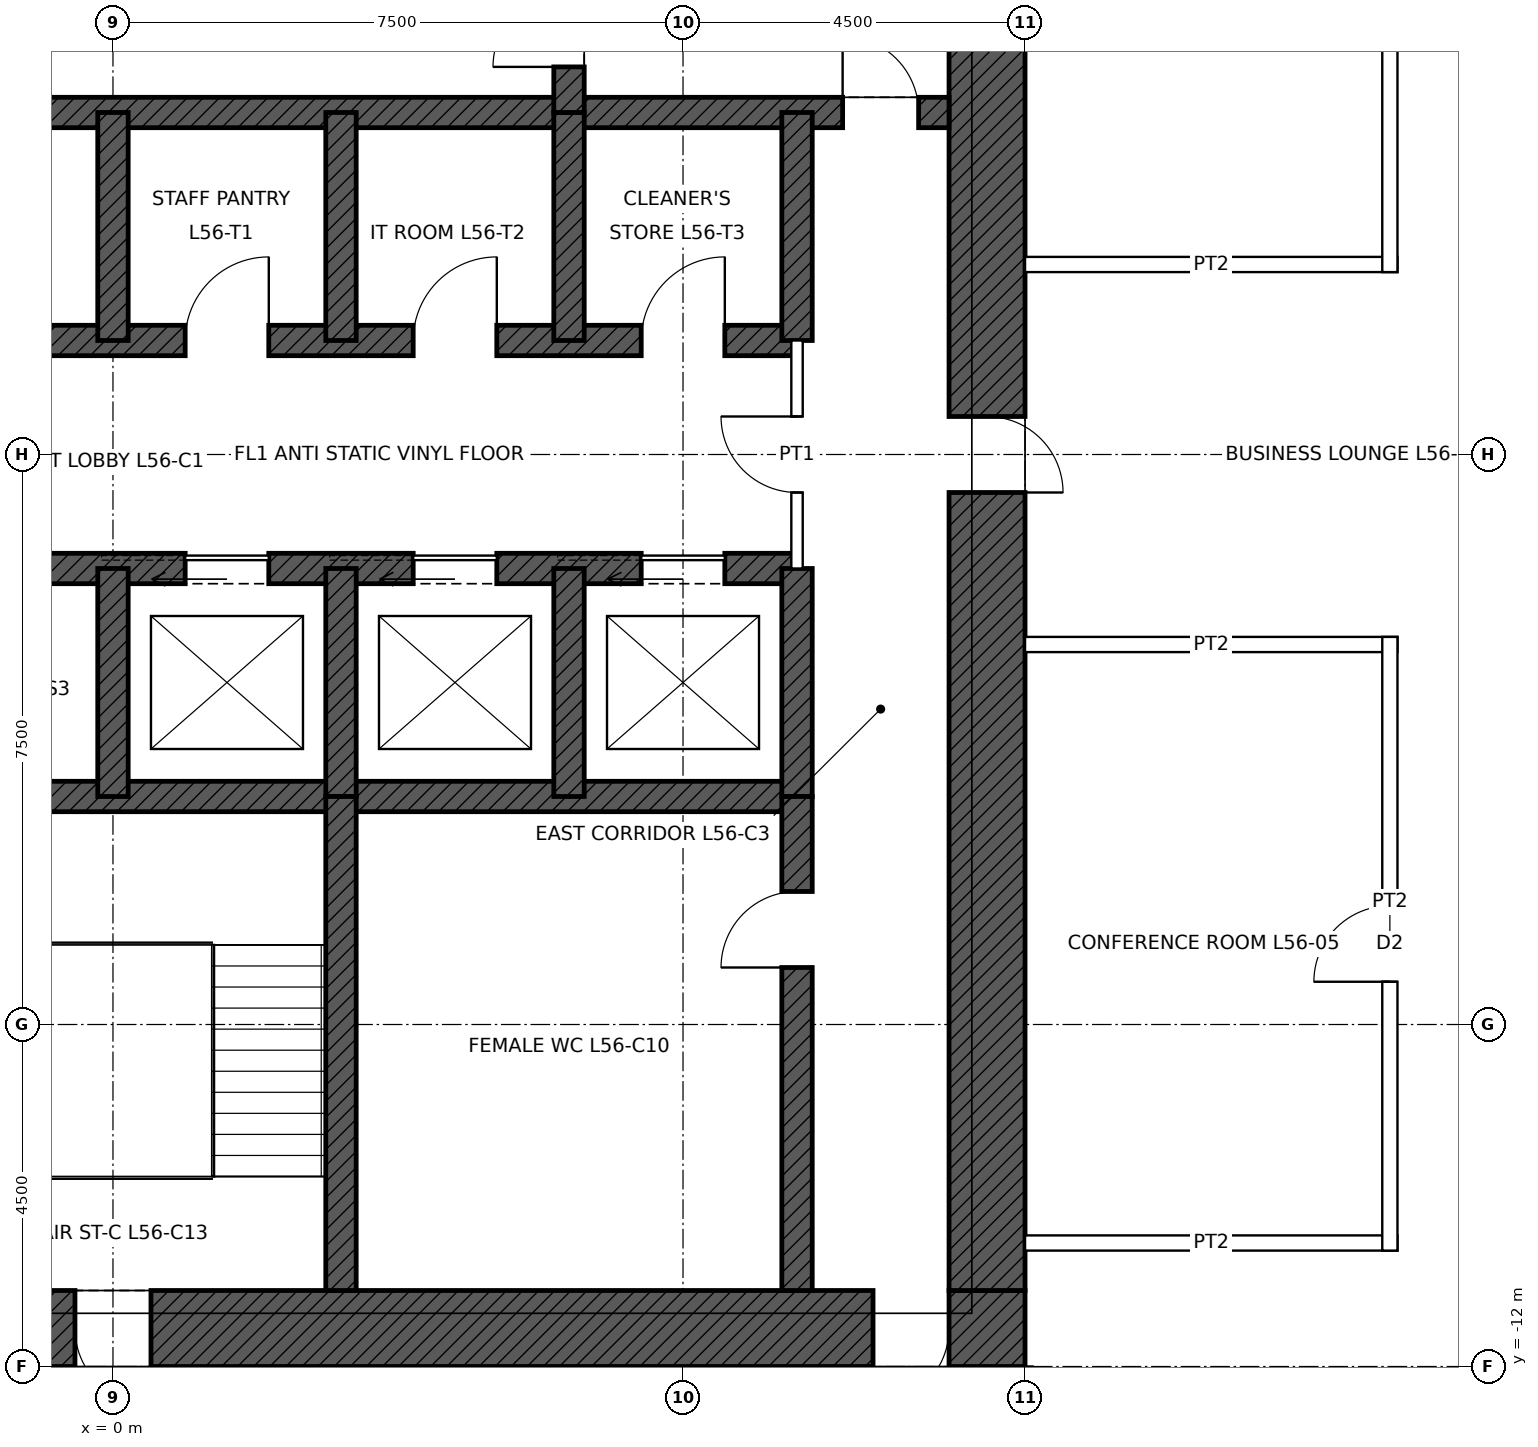
"""IFC4 building model, lengths in metres.
Left out: names, types, materials, properties, quantities, classifications, styles, units other than length and angle.
Written with IfcOpenShell. Run it as: python <this file> out.ifc"""

import sys

from ifc_helpers import new_model, si_unit, direction, frame, frame_2d, origin, place, context, subcontext, project, spatial, rectangle, extrude, element, fill, save


model = new_model("IFC4")
c1 = context("Model", 3, precision=1e-05, world=origin(), true_north=direction((0.0, 1.0)))
c2 = subcontext(c1, "Body", "Model", "MODEL_VIEW")
j1 = project(units=[si_unit("LENGTHUNIT", "METRE"), si_unit("PLANEANGLEUNIT", "RADIAN")], contexts=[c1])
p1 = place(None, origin())
s1 = spatial("IfcSite", under=j1, at=p1, CompositionType="ELEMENT")
p2 = place(p1, origin())
s2 = spatial("IfcBuilding", under=s1, at=p2, CompositionType="ELEMENT")
p3 = place(p2, frame((0.0, 0.0, 259.9)))
s3 = spatial("IfcBuildingStorey", under=s2, at=p3, CompositionType="ELEMENT", Elevation=259.9)
p4 = place(p3, frame((12.0, -11.5, 0.0), z_axis=(0.0, 0.0, 1.0), x_axis=(-1.0, 0.0, 0.0)))
e1 = element("IfcWall", 1, at=p4, inside=s3, PredefinedType="SHEAR", context=c2, shape_type="SweptSolid", body=[
    extrude(rectangle(XDim=24.0, YDim=1.0, at=frame_2d((12.0, 0.0))), origin(), (0.0, 0.0, 1.0), 4.0),
])
p5 = place(p4, frame((11.5, 0.0, 0.0)))
e2 = element("IfcOpeningElement", 2, at=p5, cuts=e1, PredefinedType="OPENING", context=c2, shape_type="SweptSolid", body=[
    extrude(rectangle(XDim=1.0, YDim=2.1, at=frame_2d((0.5, 1.05))), frame((0.0, 0.51, 0.0), z_axis=(0.0, -1.0, 0.0), x_axis=(1.0, 0.0, 0.0)), (0.0, 0.0, 1.0), 1.02),
])
p6 = place(p4, frame((1.0, 0.0, 0.0)))
e3 = element("IfcOpeningElement", 3, at=p6, cuts=e1, PredefinedType="OPENING", context=c2, shape_type="SweptSolid", body=[
    extrude(rectangle(XDim=1.0, YDim=2.4, at=frame_2d((0.5, 1.2))), frame((0.0, 0.51, 0.0), z_axis=(0.0, -1.0, 0.0), x_axis=(1.0, 0.0, 0.0)), (0.0, 0.0, 1.0), 1.02),
])
p7 = place(p3, frame((11.5, 11.0, 0.0), z_axis=(0.0, 0.0, 1.0), x_axis=(0.0, -1.0, 0.0)))
e4 = element("IfcWall", 4, at=p7, inside=s3, PredefinedType="SHEAR", context=c2, shape_type="SweptSolid", body=[
    extrude(rectangle(XDim=22.0, YDim=1.0, at=frame_2d((11.0, 0.0))), origin(), (0.0, 0.0, 1.0), 4.0),
])
p8 = place(p7, frame((10.5, 0.0, 0.0)))
e5 = element("IfcOpeningElement", 5, at=p8, cuts=e4, PredefinedType="OPENING", context=c2, shape_type="SweptSolid", body=[
    extrude(rectangle(XDim=1.0, YDim=2.4, at=frame_2d((0.5, 1.2))), frame((0.0, 0.51, 0.0), z_axis=(0.0, -1.0, 0.0), x_axis=(1.0, 0.0, 0.0)), (0.0, 0.0, 1.0), 1.02),
])
p9 = place(p3, frame((-11.0, 4.5, 0.0), z_axis=(0.0, 0.0, 1.0), x_axis=(1.0, 0.0, 0.0)))
e6 = element("IfcWall", 6, at=p9, inside=s3, PredefinedType="SHEAR", context=c2, shape_type="SweptSolid", body=[
    extrude(rectangle(XDim=22.0, YDim=0.4, at=frame_2d((11.0, 0.0))), origin(), (0.0, 0.0, 1.0), 4.0),
])
p10 = place(p9, frame((0.4, 0.0, 0.0)))
e7 = element("IfcOpeningElement", 7, at=p10, cuts=e6, PredefinedType="OPENING", context=c2, shape_type="SweptSolid", body=[
    extrude(rectangle(XDim=1.0, YDim=2.1, at=frame_2d((0.5, 1.05))), frame((0.0, 0.21, 0.0), z_axis=(0.0, -1.0, 0.0), x_axis=(1.0, 0.0, 0.0)), (0.0, 0.0, 1.0), 0.42),
])
p11 = place(p9, frame((20.6, 0.0, 0.0)))
e8 = element("IfcOpeningElement", 8, at=p11, cuts=e6, PredefinedType="OPENING", context=c2, shape_type="SweptSolid", body=[
    extrude(rectangle(XDim=1.0, YDim=2.1, at=frame_2d((0.5, 1.05))), frame((0.0, 0.21, 0.0), z_axis=(0.0, -1.0, 0.0), x_axis=(1.0, 0.0, 0.0)), (0.0, 0.0, 1.0), 0.42),
])
p12 = place(p3, frame((-9.0, 1.5, 0.0), z_axis=(0.0, 0.0, 1.0), x_axis=(1.0, 0.0, 0.0)))
e9 = element("IfcWall", 9, at=p12, inside=s3, PredefinedType="SHEAR", context=c2, shape_type="SweptSolid", body=[
    extrude(rectangle(XDim=18.0, YDim=0.4, at=frame_2d((9.0, 0.0))), origin(), (0.0, 0.0, 1.0), 4.0),
])
p13 = place(p12, frame((0.95, 0.0, 0.0)))
e10 = element("IfcOpeningElement", 10, at=p13, cuts=e9, PredefinedType="OPENING", context=c2, shape_type="SweptSolid", body=[
    extrude(rectangle(XDim=1.1, YDim=2.1, at=frame_2d((0.55, 1.05))), frame((0.0, 0.21, 0.0), z_axis=(0.0, -1.0, 0.0), x_axis=(1.0, 0.0, 0.0)), (0.0, 0.0, 1.0), 0.42),
])
p14 = place(p12, frame((3.95, 0.0, 0.0)))
e11 = element("IfcOpeningElement", 11, at=p14, cuts=e9, PredefinedType="OPENING", context=c2, shape_type="SweptSolid", body=[
    extrude(rectangle(XDim=1.1, YDim=2.1, at=frame_2d((0.55, 1.05))), frame((0.0, 0.21, 0.0), z_axis=(0.0, -1.0, 0.0), x_axis=(1.0, 0.0, 0.0)), (0.0, 0.0, 1.0), 0.42),
])
p15 = place(p12, frame((6.95, 0.0, 0.0)))
e12 = element("IfcOpeningElement", 12, at=p15, cuts=e9, PredefinedType="OPENING", context=c2, shape_type="SweptSolid", body=[
    extrude(rectangle(XDim=1.1, YDim=2.1, at=frame_2d((0.55, 1.05))), frame((0.0, 0.21, 0.0), z_axis=(0.0, -1.0, 0.0), x_axis=(1.0, 0.0, 0.0)), (0.0, 0.0, 1.0), 0.42),
])
p16 = place(p12, frame((9.95, 0.0, 0.0)))
e13 = element("IfcOpeningElement", 13, at=p16, cuts=e9, PredefinedType="OPENING", context=c2, shape_type="SweptSolid", body=[
    extrude(rectangle(XDim=1.1, YDim=2.1, at=frame_2d((0.55, 1.05))), frame((0.0, 0.21, 0.0), z_axis=(0.0, -1.0, 0.0), x_axis=(1.0, 0.0, 0.0)), (0.0, 0.0, 1.0), 0.42),
])
p17 = place(p12, frame((12.95, 0.0, 0.0)))
e14 = element("IfcOpeningElement", 14, at=p17, cuts=e9, PredefinedType="OPENING", context=c2, shape_type="SweptSolid", body=[
    extrude(rectangle(XDim=1.1, YDim=2.1, at=frame_2d((0.55, 1.05))), frame((0.0, 0.21, 0.0), z_axis=(0.0, -1.0, 0.0), x_axis=(1.0, 0.0, 0.0)), (0.0, 0.0, 1.0), 0.42),
])
p18 = place(p12, frame((15.95, 0.0, 0.0)))
e15 = element("IfcOpeningElement", 15, at=p18, cuts=e9, PredefinedType="OPENING", context=c2, shape_type="SweptSolid", body=[
    extrude(rectangle(XDim=1.1, YDim=2.1, at=frame_2d((0.55, 1.05))), frame((0.0, 0.21, 0.0), z_axis=(0.0, -1.0, 0.0), x_axis=(1.0, 0.0, 0.0)), (0.0, 0.0, 1.0), 0.42),
])
p19 = place(p3, frame((-9.0, -1.5, 0.0), z_axis=(0.0, 0.0, 1.0), x_axis=(1.0, 0.0, 0.0)))
e16 = element("IfcWall", 16, at=p19, inside=s3, PredefinedType="SHEAR", context=c2, shape_type="SweptSolid", body=[
    extrude(rectangle(XDim=18.0, YDim=0.4, at=frame_2d((9.0, 0.0))), origin(), (0.0, 0.0, 1.0), 4.0),
])
p20 = place(p19, frame((9.95, 0.0, 0.0)))
e17 = element("IfcOpeningElement", 17, at=p20, cuts=e16, PredefinedType="OPENING", context=c2, shape_type="SweptSolid", body=[
    extrude(rectangle(XDim=1.1, YDim=2.1, at=frame_2d((0.55, 1.05))), frame((0.0, 0.21, 0.0), z_axis=(0.0, -1.0, 0.0), x_axis=(1.0, 0.0, 0.0)), (0.0, 0.0, 1.0), 0.42),
])
p21 = place(p19, frame((12.95, 0.0, 0.0)))
e18 = element("IfcOpeningElement", 18, at=p21, cuts=e16, PredefinedType="OPENING", context=c2, shape_type="SweptSolid", body=[
    extrude(rectangle(XDim=1.1, YDim=2.1, at=frame_2d((0.55, 1.05))), frame((0.0, 0.21, 0.0), z_axis=(0.0, -1.0, 0.0), x_axis=(1.0, 0.0, 0.0)), (0.0, 0.0, 1.0), 0.42),
])
p22 = place(p19, frame((15.95, 0.0, 0.0)))
e19 = element("IfcOpeningElement", 19, at=p22, cuts=e16, PredefinedType="OPENING", context=c2, shape_type="SweptSolid", body=[
    extrude(rectangle(XDim=1.1, YDim=2.1, at=frame_2d((0.55, 1.05))), frame((0.0, 0.21, 0.0), z_axis=(0.0, -1.0, 0.0), x_axis=(1.0, 0.0, 0.0)), (0.0, 0.0, 1.0), 0.42),
])
p23 = place(p19, frame((0.95, 0.0, 0.0)))
e20 = element("IfcOpeningElement", 20, at=p23, cuts=e16, PredefinedType="OPENING", context=c2, shape_type="SweptSolid", body=[
    extrude(rectangle(XDim=1.1, YDim=2.1, at=frame_2d((0.55, 1.05))), frame((0.0, 0.21, 0.0), z_axis=(0.0, -1.0, 0.0), x_axis=(1.0, 0.0, 0.0)), (0.0, 0.0, 1.0), 0.42),
])
p24 = place(p19, frame((3.95, 0.0, 0.0)))
e21 = element("IfcOpeningElement", 21, at=p24, cuts=e16, PredefinedType="OPENING", context=c2, shape_type="SweptSolid", body=[
    extrude(rectangle(XDim=1.1, YDim=2.1, at=frame_2d((0.55, 1.05))), frame((0.0, 0.21, 0.0), z_axis=(0.0, -1.0, 0.0), x_axis=(1.0, 0.0, 0.0)), (0.0, 0.0, 1.0), 0.42),
])
p25 = place(p19, frame((6.95, 0.0, 0.0)))
e22 = element("IfcOpeningElement", 22, at=p25, cuts=e16, PredefinedType="OPENING", context=c2, shape_type="SweptSolid", body=[
    extrude(rectangle(XDim=1.1, YDim=2.1, at=frame_2d((0.55, 1.05))), frame((0.0, 0.21, 0.0), z_axis=(0.0, -1.0, 0.0), x_axis=(1.0, 0.0, 0.0)), (0.0, 0.0, 1.0), 0.42),
])
p26 = place(p3, frame((-9.0, -4.5, 0.0), z_axis=(0.0, 0.0, 1.0), x_axis=(1.0, 0.0, 0.0)))
e23 = element("IfcWall", 23, at=p26, inside=s3, PredefinedType="SHEAR", context=c2, shape_type="SweptSolid", body=[
    extrude(rectangle(XDim=18.0, YDim=0.4, at=frame_2d((9.0, 0.0))), origin(), (0.0, 0.0, 1.0), 4.0),
])
for number, where, z_axis, x_axis in (
    (24, (9.0, 1.5, 0.0), (0.0, 0.0, 1.0), (0.0, 1.0, 0.0)),
    (25, (9.0, -4.5, 0.0), (0.0, 0.0, 1.0), (0.0, 1.0, 0.0)),
    (26, (0.0, 1.5, 0.0), (0.0, 0.0, 1.0), (0.0, 1.0, 0.0)),
    (27, (3.0, 1.5, 0.0), (0.0, 0.0, 1.0), (0.0, 1.0, 0.0)),
    (28, (6.0, 1.5, 0.0), (0.0, 0.0, 1.0), (0.0, 1.0, 0.0)),
    (29, (0.0, -4.5, 0.0), (0.0, 0.0, 1.0), (0.0, 1.0, 0.0)),
    (30, (3.0, -4.5, 0.0), (0.0, 0.0, 1.0), (0.0, 1.0, 0.0)),
    (31, (6.0, -4.5, 0.0), (0.0, 0.0, 1.0), (0.0, 1.0, 0.0)),
):
    element("IfcWall", number, at=place(p3, frame(where, z_axis=z_axis, x_axis=x_axis)), inside=s3, PredefinedType="SHEAR", context=c2, shape_type="SweptSolid", body=[
        extrude(rectangle(XDim=3.0, YDim=0.4, at=frame_2d((1.5, 0.0))), origin(), (0.0, 0.0, 1.0), 4.0),
    ])
p27 = place(p3, frame((6.0, 4.5, 0.0), z_axis=(0.0, 0.0, 1.0), x_axis=(0.0, 1.0, 0.0)))
e32 = element("IfcWall", 32, at=p27, inside=s3, PredefinedType="SHEAR", context=c2, shape_type="SweptSolid", body=[
    extrude(rectangle(XDim=6.5, YDim=0.4, at=frame_2d((3.25, 0.0))), origin(), (0.0, 0.0, 1.0), 4.0),
])
p28 = place(p27, frame((0.6, 0.0, 0.0)))
e33 = element("IfcOpeningElement", 33, at=p28, cuts=e32, PredefinedType="OPENING", context=c2, shape_type="SweptSolid", body=[
    extrude(rectangle(XDim=1.0, YDim=2.1, at=frame_2d((0.5, 1.05))), frame((0.0, 0.21, 0.0), z_axis=(0.0, -1.0, 0.0), x_axis=(1.0, 0.0, 0.0)), (0.0, 0.0, 1.0), 0.42),
])
p29 = place(p3, frame((9.0, -11.0, 0.0), z_axis=(0.0, 0.0, 1.0), x_axis=(0.0, 1.0, 0.0)))
e34 = element("IfcWall", 34, at=p29, inside=s3, PredefinedType="SHEAR", context=c2, shape_type="SweptSolid", body=[
    extrude(rectangle(XDim=6.5, YDim=0.4, at=frame_2d((3.25, 0.0))), origin(), (0.0, 0.0, 1.0), 4.0),
])
p30 = place(p29, frame((4.25, 0.0, 0.0)))
e35 = element("IfcOpeningElement", 35, at=p30, cuts=e34, PredefinedType="OPENING", context=c2, shape_type="SweptSolid", body=[
    extrude(rectangle(XDim=1.0, YDim=2.1, at=frame_2d((0.5, 1.05))), frame((0.0, 0.21, 0.0), z_axis=(0.0, -1.0, 0.0), x_axis=(1.0, 0.0, 0.0)), (0.0, 0.0, 1.0), 0.42),
])
p31 = place(p3, frame((3.0, -11.0, 0.0), z_axis=(0.0, 0.0, 1.0), x_axis=(0.0, 1.0, 0.0)))
e36 = element("IfcWall", 36, at=p31, inside=s3, PredefinedType="SHEAR", context=c2, shape_type="SweptSolid", body=[
    extrude(rectangle(XDim=6.5, YDim=0.4, at=frame_2d((3.25, 0.0))), origin(), (0.0, 0.0, 1.0), 4.0),
])
for number, where, z_axis, x_axis in (
    (37, (12.0, -10.375, 0.0), (0.0, 0.0, 1.0), (1.0, 0.0, 0.0)),
    (38, (12.0, -2.5, 0.0), (0.0, 0.0, 1.0), (1.0, 0.0, 0.0)),
    (39, (12.0, 2.5, 0.0), (0.0, 0.0, 1.0), (1.0, 0.0, 0.0)),
):
    element("IfcWall", number, at=place(p3, frame(where, z_axis=z_axis, x_axis=x_axis)), inside=s3, PredefinedType="PARTITIONING", context=c2, shape_type="SweptSolid", body=[
        extrude(rectangle(XDim=4.9, YDim=0.2, at=frame_2d((2.45, 0.0))), origin(), (0.0, 0.0, 1.0), 3.85),
    ])
p32 = place(p3, frame((16.8, -10.475, 0.0), z_axis=(0.0, 0.0, 1.0), x_axis=(0.0, 1.0, 0.0)))
e40 = element("IfcWall", 40, at=p32, inside=s3, PredefinedType="PARTITIONING", context=c2, shape_type="SweptSolid", body=[
    extrude(rectangle(XDim=8.075, YDim=0.2, at=frame_2d((4.038, 0.0))), origin(), (0.0, 0.0, 1.0), 3.85),
])
p33 = place(p32, frame((3.538, 0.0, 0.0)))
e41 = element("IfcOpeningElement", 41, at=p33, cuts=e40, PredefinedType="OPENING", context=c2, shape_type="SweptSolid", body=[
    extrude(rectangle(XDim=1.0, YDim=2.1, at=frame_2d((0.5, 1.05))), frame((0.0, 0.11, 0.0), z_axis=(0.0, -1.0, 0.0), x_axis=(1.0, 0.0, 0.0)), (0.0, 0.0, 1.0), 0.22),
])
p34 = place(p3, frame((16.8, 2.4, 0.0), z_axis=(0.0, 0.0, 1.0), x_axis=(0.0, 1.0, 0.0)))
e42 = element("IfcWall", 42, at=p34, inside=s3, PredefinedType="PARTITIONING", context=c2, shape_type="SweptSolid", body=[
    extrude(rectangle(XDim=8.075, YDim=0.2, at=frame_2d((4.038, 0.0))), origin(), (0.0, 0.0, 1.0), 3.85),
])
p35 = place(p34, frame((3.538, 0.0, 0.0)))
e43 = element("IfcOpeningElement", 43, at=p35, cuts=e42, PredefinedType="OPENING", context=c2, shape_type="SweptSolid", body=[
    extrude(rectangle(XDim=1.0, YDim=2.1, at=frame_2d((0.5, 1.05))), frame((0.0, 0.11, 0.0), z_axis=(0.0, -1.0, 0.0), x_axis=(1.0, 0.0, 0.0)), (0.0, 0.0, 1.0), 0.22),
])
p36 = place(p3, frame((9.0, -1.5, 0.0), z_axis=(0.0, 0.0, 1.0), x_axis=(0.0, 1.0, 0.0)))
e44 = element("IfcWall", 44, at=p36, inside=s3, PredefinedType="PARTITIONING", context=c2, shape_type="SweptSolid", body=[
    extrude(rectangle(XDim=3.0, YDim=0.15, at=frame_2d((1.5, 0.0))), origin(), (0.0, 0.0, 1.0), 3.75),
])
p37 = place(p36, frame((1.0, 0.0, 0.0)))
e45 = element("IfcOpeningElement", 45, at=p37, cuts=e44, PredefinedType="OPENING", context=c2, shape_type="SweptSolid", body=[
    extrude(rectangle(XDim=1.0, YDim=2.4, at=frame_2d((0.5, 1.2))), frame((0.0, 0.085, 0.0), z_axis=(0.0, -1.0, 0.0), x_axis=(1.0, 0.0, 0.0)), (0.0, 0.0, 1.0), 0.17),
])
p38 = place(p11, origin())
e46 = element("IfcDoor", 46, at=p38, inside=s3, OperationType="SINGLE_SWING_LEFT", PredefinedType="DOOR", context=c2, shape_type="SweptSolid", body=[
    extrude(rectangle(XDim=1.0, YDim=2.1, at=frame_2d((0.5, 1.05))), frame((0.0, 0.025, 0.0), z_axis=(0.0, -1.0, 0.0), x_axis=(1.0, 0.0, 0.0)), (0.0, 0.0, 1.0), 0.05),
])
fill(e8, e46)
p39 = place(p28, origin())
e47 = element("IfcDoor", 47, at=p39, inside=s3, OperationType="SINGLE_SWING_LEFT", PredefinedType="DOOR", context=c2, shape_type="SweptSolid", body=[
    extrude(rectangle(XDim=1.0, YDim=2.1, at=frame_2d((0.5, 1.05))), frame((0.0, 0.025, 0.0), z_axis=(0.0, -1.0, 0.0), x_axis=(1.0, 0.0, 0.0)), (0.0, 0.0, 1.0), 0.05),
])
fill(e33, e47)
p40 = place(p5, origin())
e48 = element("IfcDoor", 48, at=p40, inside=s3, OperationType="SINGLE_SWING_LEFT", PredefinedType="DOOR", context=c2, shape_type="SweptSolid", body=[
    extrude(rectangle(XDim=1.0, YDim=2.1, at=frame_2d((0.5, 1.05))), frame((0.0, 0.485, 0.0), z_axis=(0.0, -1.0, 0.0), x_axis=(1.0, 0.0, 0.0)), (0.0, 0.0, 1.0), 0.05),
])
fill(e2, e48)
p41 = place(p8, origin())
e49 = element("IfcDoor", 49, at=p41, inside=s3, OperationType="SINGLE_SWING_RIGHT", PredefinedType="DOOR", context=c2, shape_type="SweptSolid", body=[
    extrude(rectangle(XDim=1.0, YDim=2.4, at=frame_2d((0.5, 1.2))), frame((0.0, 0.485, 0.0), z_axis=(0.0, -1.0, 0.0), x_axis=(1.0, 0.0, 0.0)), (0.0, 0.0, 1.0), 0.05),
])
fill(e5, e49)
p42 = place(p6, origin())
e50 = element("IfcDoor", 50, at=p42, inside=s3, OperationType="SINGLE_SWING_RIGHT", PredefinedType="DOOR", context=c2, shape_type="SweptSolid", body=[
    extrude(rectangle(XDim=1.0, YDim=2.4, at=frame_2d((0.5, 1.2))), frame((0.0, 0.485, 0.0), z_axis=(0.0, -1.0, 0.0), x_axis=(1.0, 0.0, 0.0)), (0.0, 0.0, 1.0), 0.05),
])
fill(e3, e50)
p43 = place(p30, origin())
e51 = element("IfcDoor", 51, at=p43, inside=s3, OperationType="SINGLE_SWING_LEFT", PredefinedType="DOOR", context=c2, shape_type="SweptSolid", body=[
    extrude(rectangle(XDim=1.0, YDim=2.1, at=frame_2d((0.5, 1.05))), frame((0.0, 0.025, 0.0), z_axis=(0.0, -1.0, 0.0), x_axis=(1.0, 0.0, 0.0)), (0.0, 0.0, 1.0), 0.05),
])
fill(e35, e51)
p44 = place(p20, origin())
e52 = element("IfcDoor", 52, at=p44, inside=s3, OperationType="SLIDING_TO_LEFT", PredefinedType="DOOR", context=c2, shape_type="SweptSolid", body=[
    extrude(rectangle(XDim=1.1, YDim=2.1, at=frame_2d((0.55, 1.05))), frame((0.0, 0.025, 0.0), z_axis=(0.0, -1.0, 0.0), x_axis=(1.0, 0.0, 0.0)), (0.0, 0.0, 1.0), 0.05),
])
fill(e17, e52)
p45 = place(p21, origin())
e53 = element("IfcDoor", 53, at=p45, inside=s3, OperationType="SLIDING_TO_LEFT", PredefinedType="DOOR", context=c2, shape_type="SweptSolid", body=[
    extrude(rectangle(XDim=1.1, YDim=2.1, at=frame_2d((0.55, 1.05))), frame((0.0, 0.025, 0.0), z_axis=(0.0, -1.0, 0.0), x_axis=(1.0, 0.0, 0.0)), (0.0, 0.0, 1.0), 0.05),
])
fill(e18, e53)
p46 = place(p22, origin())
e54 = element("IfcDoor", 54, at=p46, inside=s3, OperationType="SLIDING_TO_LEFT", PredefinedType="DOOR", context=c2, shape_type="SweptSolid", body=[
    extrude(rectangle(XDim=1.1, YDim=2.1, at=frame_2d((0.55, 1.05))), frame((0.0, 0.025, 0.0), z_axis=(0.0, -1.0, 0.0), x_axis=(1.0, 0.0, 0.0)), (0.0, 0.0, 1.0), 0.05),
])
fill(e19, e54)
p47 = place(p37, origin())
e55 = element("IfcDoor", 55, at=p47, inside=s3, OperationType="SINGLE_SWING_RIGHT", PredefinedType="DOOR", context=c2, shape_type="SweptSolid", body=[
    extrude(rectangle(XDim=1.0, YDim=2.4, at=frame_2d((0.5, 1.2))), frame((0.0, 0.025, 0.0), z_axis=(0.0, -1.0, 0.0), x_axis=(1.0, 0.0, 0.0)), (0.0, 0.0, 1.0), 0.05),
])
fill(e45, e55)
p48 = place(p16, origin())
e56 = element("IfcDoor", 56, at=p48, inside=s3, OperationType="SINGLE_SWING_RIGHT", PredefinedType="DOOR", context=c2, shape_type="SweptSolid", body=[
    extrude(rectangle(XDim=1.1, YDim=2.1, at=frame_2d((0.55, 1.05))), frame((0.0, 0.025, 0.0), z_axis=(0.0, -1.0, 0.0), x_axis=(1.0, 0.0, 0.0)), (0.0, 0.0, 1.0), 0.05),
])
fill(e13, e56)
p49 = place(p17, origin())
e57 = element("IfcDoor", 57, at=p49, inside=s3, OperationType="SINGLE_SWING_RIGHT", PredefinedType="DOOR", context=c2, shape_type="SweptSolid", body=[
    extrude(rectangle(XDim=1.1, YDim=2.1, at=frame_2d((0.55, 1.05))), frame((0.0, 0.025, 0.0), z_axis=(0.0, -1.0, 0.0), x_axis=(1.0, 0.0, 0.0)), (0.0, 0.0, 1.0), 0.05),
])
fill(e14, e57)
p50 = place(p18, origin())
e58 = element("IfcDoor", 58, at=p50, inside=s3, OperationType="SINGLE_SWING_RIGHT", PredefinedType="DOOR", context=c2, shape_type="SweptSolid", body=[
    extrude(rectangle(XDim=1.1, YDim=2.1, at=frame_2d((0.55, 1.05))), frame((0.0, 0.025, 0.0), z_axis=(0.0, -1.0, 0.0), x_axis=(1.0, 0.0, 0.0)), (0.0, 0.0, 1.0), 0.05),
])
fill(e15, e58)
p51 = place(p33, origin())
e59 = element("IfcDoor", 59, at=p51, inside=s3, OperationType="SINGLE_SWING_LEFT", PredefinedType="DOOR", context=c2, shape_type="SweptSolid", body=[
    extrude(rectangle(XDim=1.0, YDim=2.1, at=frame_2d((0.5, 1.05))), frame((0.0, 0.025, 0.0), z_axis=(0.0, -1.0, 0.0), x_axis=(1.0, 0.0, 0.0)), (0.0, 0.0, 1.0), 0.05),
])
fill(e41, e59)
save(model, sys.argv[1])
